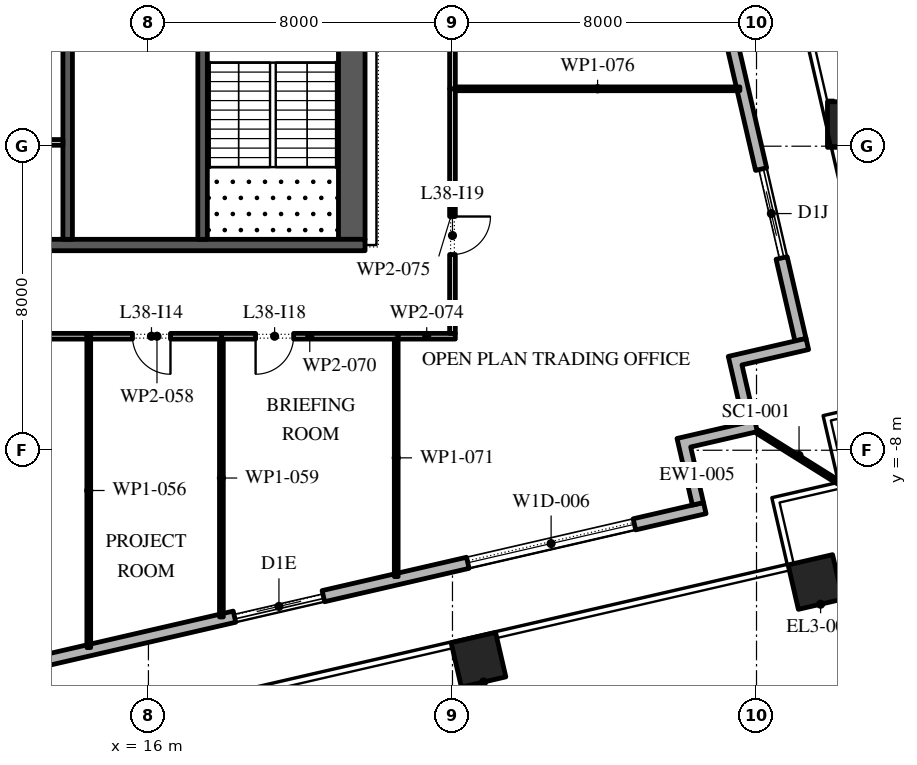
"""IFC4 building model, lengths in metres.
Left out: names, types, materials, properties, quantities, classifications, styles, units other than length and angle.
Written with IfcOpenShell. Run it as: python <this file> out.ifc"""

import sys

from ifc_helpers import new_model, si_unit, direction, frame, frame_2d, origin, origin_2d, place, context, subcontext, project, spatial, polyline, rectangle, outline, extrude, element, fill, save


model = new_model("IFC4")
c1 = context("Model", 3, precision=1e-05, world=origin(), true_north=direction((0.0, 1.0)))
c2 = subcontext(c1, "Body", "Model", "MODEL_VIEW")
j1 = project(units=[si_unit("LENGTHUNIT", "METRE"), si_unit("PLANEANGLEUNIT", "RADIAN")], contexts=[c1])
p1 = place(None, origin())
s1 = spatial("IfcSite", under=j1, at=p1, CompositionType="ELEMENT")
p2 = place(p1, origin())
s2 = spatial("IfcBuilding", under=s1, at=p2, CompositionType="ELEMENT")
p3 = place(p2, frame((0.0, 0.0, 175.8)))
s3 = spatial("IfcBuildingStorey", under=s2, at=p3, CompositionType="ELEMENT", Elevation=175.8)
for number, where, z_axis, x_axis in (
    (1, (24.685, -13.514, 0.0), (0.0, 0.0, 1.0), (0.974, 0.225, 0.0)),
    (2, (33.551, -11.467, 0.0), (0.0, 0.0, 1.0), (0.974, 0.225, 0.0)),
):
    element("IfcColumn", number, at=place(p3, frame(where, z_axis=z_axis, x_axis=x_axis)), inside=s3, PredefinedType="COLUMN", context=c2, shape_type="SweptSolid", body=[
        extrude(rectangle(XDim=1.2, YDim=1.2, at=origin_2d()), origin(), (0.0, 0.0, 1.0), 4.2),
    ])
p4 = place(p3, frame((34.467, 0.57, 0.0), z_axis=(-0.00267376016, 0.011683169396, 0.9999281747), x_axis=(-0.974798272484, -0.223088161862, 0.0)))
e3 = element("IfcColumn", 3, at=p4, inside=s3, PredefinedType="COLUMN", context=c2, shape_type="SweptSolid", body=[
    extrude(rectangle(XDim=1.2, YDim=1.2, at=origin_2d()), origin(), (0.0, 0.0, 1.0), 4.2),
])
p5 = place(p3, frame((-17.592, -20.657, 0.0), z_axis=(0.0, 0.0, 1.0), x_axis=(0.974370243697, 0.224950279389, 0.0)))
e4 = element("IfcWall", 4, at=p5, inside=s3, PredefinedType="STANDARD", context=c2, shape_type="SweptSolid", body=[
    extrude(rectangle(XDim=49.5, YDim=0.3, at=frame_2d((24.75, 0.0))), origin(), (0.0, 0.0, 1.0), 4.0),
])
p6 = place(p5, frame((3.6, 0.0, 0.0)))
e5 = element("IfcOpeningElement", 5, at=p6, cuts=e4, PredefinedType="OPENING", context=c2, shape_type="SweptSolid", body=[
    extrude(rectangle(XDim=2.4, YDim=3.5, at=frame_2d((1.2, 1.75))), frame((0.0, 0.16, 0.0), z_axis=(0.0, -1.0, 0.0), x_axis=(1.0, 0.0, 0.0)), (0.0, 0.0, 1.0), 0.32),
])
p7 = place(p5, frame((9.9, 0.0, 0.45)))
e6 = element("IfcOpeningElement", 6, at=p7, cuts=e4, PredefinedType="OPENING", context=c2, shape_type="SweptSolid", body=[
    extrude(rectangle(XDim=4.5, YDim=2.575, at=frame_2d((2.25, 1.288))), frame((0.0, 0.16, 0.0), z_axis=(0.0, -1.0, 0.0), x_axis=(1.0, 0.0, 0.0)), (0.0, 0.0, 1.0), 0.32),
])
p8 = place(p5, frame((18.2, 0.0, 0.45)))
e7 = element("IfcOpeningElement", 7, at=p8, cuts=e4, PredefinedType="OPENING", context=c2, shape_type="SweptSolid", body=[
    extrude(rectangle(XDim=4.5, YDim=3.05, at=frame_2d((2.25, 1.525))), frame((0.0, 0.16, 0.0), z_axis=(0.0, -1.0, 0.0), x_axis=(1.0, 0.0, 0.0)), (0.0, 0.0, 1.0), 0.32),
])
p9 = place(p5, frame((26.5, 0.0, 0.45)))
e8 = element("IfcOpeningElement", 8, at=p9, cuts=e4, PredefinedType="OPENING", context=c2, shape_type="SweptSolid", body=[
    extrude(rectangle(XDim=4.5, YDim=2.75, at=frame_2d((2.25, 1.375))), frame((0.0, 0.16, 0.0), z_axis=(0.0, -1.0, 0.0), x_axis=(1.0, 0.0, 0.0)), (0.0, 0.0, 1.0), 0.32),
])
p10 = place(p5, frame((36.8, 0.0, 0.0)))
e9 = element("IfcOpeningElement", 9, at=p10, cuts=e4, PredefinedType="OPENING", context=c2, shape_type="SweptSolid", body=[
    extrude(rectangle(XDim=2.4, YDim=3.275, at=frame_2d((1.2, 1.637))), frame((0.0, 0.16, 0.0), z_axis=(0.0, -1.0, 0.0), x_axis=(1.0, 0.0, 0.0)), (0.0, 0.0, 1.0), 0.32),
])
p11 = place(p5, frame((43.1, 0.0, 0.45)))
e10 = element("IfcOpeningElement", 10, at=p11, cuts=e4, PredefinedType="OPENING", context=c2, shape_type="SweptSolid", body=[
    extrude(rectangle(XDim=4.5, YDim=2.875, at=frame_2d((2.25, 1.438))), frame((0.0, 0.16, 0.0), z_axis=(0.0, -1.0, 0.0), x_axis=(1.0, 0.0, 0.0)), (0.0, 0.0, 1.0), 0.32),
])
p12 = place(p3, frame((33.157, -5.092, 0.0), z_axis=(0.0, 0.0, 1.0), x_axis=(-0.224950279389, 0.974370243697, 0.0)))
e11 = element("IfcWall", 11, at=p12, inside=s3, PredefinedType="STANDARD", context=c2, shape_type="SweptSolid", body=[
    extrude(rectangle(XDim=49.5, YDim=0.3, at=frame_2d((24.75, 0.0))), origin(), (0.0, 0.0, 1.0), 4.0),
])
p13 = place(p12, frame((2.207, 0.0, 0.0)))
e12 = element("IfcOpeningElement", 12, at=p13, cuts=e11, PredefinedType="OPENING", context=c2, shape_type="SweptSolid", body=[
    extrude(rectangle(XDim=2.4, YDim=3.125, at=frame_2d((1.2, 1.562))), frame((0.0, 0.16, 0.0), z_axis=(0.0, -1.0, 0.0), x_axis=(1.0, 0.0, 0.0)), (0.0, 0.0, 1.0), 0.32),
])
p14 = place(p12, frame((8.121, 0.0, 0.45)))
e13 = element("IfcOpeningElement", 13, at=p14, cuts=e11, PredefinedType="OPENING", context=c2, shape_type="SweptSolid", body=[
    extrude(rectangle(XDim=4.5, YDim=2.875, at=frame_2d((2.25, 1.438))), frame((0.0, 0.16, 0.0), z_axis=(0.0, -1.0, 0.0), x_axis=(1.0, 0.0, 0.0)), (0.0, 0.0, 1.0), 0.32),
])
p15 = place(p12, frame((15.236, 0.0, 0.45)))
e14 = element("IfcOpeningElement", 14, at=p15, cuts=e11, PredefinedType="OPENING", context=c2, shape_type="SweptSolid", body=[
    extrude(rectangle(XDim=4.5, YDim=2.875, at=frame_2d((2.25, 1.438))), frame((0.0, 0.16, 0.0), z_axis=(0.0, -1.0, 0.0), x_axis=(1.0, 0.0, 0.0)), (0.0, 0.0, 1.0), 0.32),
])
p16 = place(p12, frame((22.35, 0.0, 0.45)))
e15 = element("IfcOpeningElement", 15, at=p16, cuts=e11, PredefinedType="OPENING", context=c2, shape_type="SweptSolid", body=[
    extrude(rectangle(XDim=4.5, YDim=3.0, at=frame_2d((2.25, 1.5))), frame((0.0, 0.16, 0.0), z_axis=(0.0, -1.0, 0.0), x_axis=(1.0, 0.0, 0.0)), (0.0, 0.0, 1.0), 0.32),
])
p17 = place(p12, frame((30.514, 0.0, 0.0)))
e16 = element("IfcOpeningElement", 16, at=p17, cuts=e11, PredefinedType="OPENING", context=c2, shape_type="SweptSolid", body=[
    extrude(rectangle(XDim=2.4, YDim=3.45, at=frame_2d((1.2, 1.725))), frame((0.0, 0.16, 0.0), z_axis=(0.0, -1.0, 0.0), x_axis=(1.0, 0.0, 0.0)), (0.0, 0.0, 1.0), 0.32),
])
p18 = place(p12, frame((36.579, 0.0, 0.45)))
e17 = element("IfcOpeningElement", 17, at=p18, cuts=e11, PredefinedType="OPENING", context=c2, shape_type="SweptSolid", body=[
    extrude(rectangle(XDim=4.5, YDim=3.05, at=frame_2d((2.25, 1.525))), frame((0.0, 0.16, 0.0), z_axis=(0.0, -1.0, 0.0), x_axis=(1.0, 0.0, 0.0)), (0.0, 0.0, 1.0), 0.32),
])
p19 = place(p12, frame((43.693, 0.0, 0.45)))
e18 = element("IfcOpeningElement", 18, at=p19, cuts=e11, PredefinedType="OPENING", context=c2, shape_type="SweptSolid", body=[
    extrude(rectangle(XDim=4.5, YDim=3.05, at=frame_2d((2.25, 1.525))), frame((0.0, 0.16, 0.0), z_axis=(0.0, -1.0, 0.0), x_axis=(1.0, 0.0, 0.0)), (0.0, 0.0, 1.0), 0.32),
])
p20 = place(p3, origin())
e19 = element("IfcWall", 19, at=p20, inside=s3, PredefinedType="STANDARD", context=c2, shape_type="SweptSolid", body=[
    extrude(outline(polyline([(31.662, -7.285), (31.257, -5.531), (33.303, -5.058), (33.371, -5.351), (31.617, -5.756), (32.022, -7.51), (30.268, -7.914), (30.605, -9.376), (30.313, -9.443), (29.908, -7.69), (31.662, -7.285)])), origin(), (0.0, 0.0, 1.0), 4.0),
])
p21 = place(p3, frame((32.022, -7.51, -0.05), z_axis=(0.0, 0.0, 1.0), x_axis=(0.848047176257, -0.529920736377, 0.0)))
e20 = element("IfcWall", 20, at=p21, inside=s3, PredefinedType="STANDARD", context=c2, shape_type="SweptSolid", body=[
    extrude(rectangle(XDim=2.526, YDim=0.1, at=frame_2d((1.263, 0.0))), origin(), (0.0, 0.0, 1.0), 4.05),
])
p22 = place(p3, frame((21.35, -2.45, 0.0), z_axis=(0.0, 0.0, 1.0), x_axis=(0.0, 1.0, 0.0)))
e21 = element("IfcWall", 21, at=p22, inside=s3, PredefinedType="SHEAR", context=c2, shape_type="SweptSolid", body=[
    extrude(rectangle(XDim=27.9, YDim=0.7, at=frame_2d((13.95, 0.0))), origin(), (0.0, 0.0, 1.0), 4.0),
])
p23 = place(p22, frame((5.05, 0.0, 0.0)))
e22 = element("IfcOpeningElement", 22, at=p23, cuts=e21, PredefinedType="OPENING", context=c2, shape_type="SweptSolid", body=[
    extrude(rectangle(XDim=1.2, YDim=2.1, at=frame_2d((0.6, 1.05))), frame((0.0, 0.36, 0.0), z_axis=(0.0, -1.0, 0.0), x_axis=(1.0, 0.0, 0.0)), (0.0, 0.0, 1.0), 0.72),
])
p24 = place(p22, frame((21.65, 0.0, 0.0)))
e23 = element("IfcOpeningElement", 23, at=p24, cuts=e21, PredefinedType="OPENING", context=c2, shape_type="SweptSolid", body=[
    extrude(rectangle(XDim=1.2, YDim=2.1, at=frame_2d((0.6, 1.05))), frame((0.0, 0.36, 0.0), z_axis=(0.0, -1.0, 0.0), x_axis=(1.0, 0.0, 0.0)), (0.0, 0.0, 1.0), 0.72),
])
p25 = place(p3, frame((10.3, -2.6, 0.0), z_axis=(0.0, 0.0, 1.0), x_axis=(1.0, 0.0, 0.0)))
e24 = element("IfcWall", 24, at=p25, inside=s3, PredefinedType="SHEAR", context=c2, shape_type="SweptSolid", body=[
    extrude(rectangle(XDim=11.4, YDim=0.3, at=frame_2d((5.7, 0.0))), origin(), (0.0, 0.0, 1.0), 4.0),
])
p26 = place(p3, frame((17.425, -2.45, 0.0), z_axis=(0.0, 0.0, 1.0), x_axis=(0.0, 1.0, 0.0)))
e25 = element("IfcWall", 25, at=p26, inside=s3, PredefinedType="SHEAR", context=c2, shape_type="SweptSolid", body=[
    extrude(rectangle(XDim=6.3, YDim=0.25, at=frame_2d((3.15, 0.0))), origin(), (0.0, 0.0, 1.0), 4.0),
])
p27 = place(p26, frame((5.05, 0.0, 0.0)))
e26 = element("IfcOpeningElement", 26, at=p27, cuts=e25, PredefinedType="OPENING", context=c2, shape_type="SweptSolid", body=[
    extrude(rectangle(XDim=1.2, YDim=2.1, at=frame_2d((0.6, 1.05))), frame((0.0, 0.135, 0.0), z_axis=(0.0, -1.0, 0.0), x_axis=(1.0, 0.0, 0.0)), (0.0, 0.0, 1.0), 0.27),
])
p28 = place(p3, frame((13.875, -2.45, 0.0), z_axis=(0.0, 0.0, 1.0), x_axis=(0.0, 1.0, 0.0)))
e27 = element("IfcWall", 27, at=p28, inside=s3, PredefinedType="SHEAR", context=c2, shape_type="SweptSolid", body=[
    extrude(rectangle(XDim=21.3, YDim=0.25, at=frame_2d((10.65, 0.0))), origin(), (0.0, 0.0, 1.0), 4.0),
])
p29 = place(p28, frame((17.786, 0.0, 0.0)))
e28 = element("IfcOpeningElement", 28, at=p29, cuts=e27, PredefinedType="OPENING", context=c2, shape_type="SweptSolid", body=[
    extrude(rectangle(XDim=0.9, YDim=2.1, at=frame_2d((0.45, 1.05))), frame((0.0, 0.135, 0.0), z_axis=(0.0, -1.0, 0.0), x_axis=(1.0, 0.0, 0.0)), (0.0, 0.0, 1.0), 0.27),
])
p30 = place(p28, frame((6.971, 0.0, 0.0)))
e29 = element("IfcOpeningElement", 29, at=p30, cuts=e27, PredefinedType="OPENING", context=c2, shape_type="SweptSolid", body=[
    extrude(rectangle(XDim=1.1, YDim=2.1, at=frame_2d((0.55, 1.05))), frame((0.0, 0.135, 0.0), z_axis=(0.0, -1.0, 0.0), x_axis=(1.0, 0.0, 0.0)), (0.0, 0.0, 1.0), 0.27),
])
p31 = place(p28, frame((9.114, 0.0, 0.0)))
e30 = element("IfcOpeningElement", 30, at=p31, cuts=e27, PredefinedType="OPENING", context=c2, shape_type="SweptSolid", body=[
    extrude(rectangle(XDim=1.1, YDim=2.1, at=frame_2d((0.55, 1.05))), frame((0.0, 0.135, 0.0), z_axis=(0.0, -1.0, 0.0), x_axis=(1.0, 0.0, 0.0)), (0.0, 0.0, 1.0), 0.27),
])
p32 = place(p28, frame((11.257, 0.0, 0.0)))
e31 = element("IfcOpeningElement", 31, at=p32, cuts=e27, PredefinedType="OPENING", context=c2, shape_type="SweptSolid", body=[
    extrude(rectangle(XDim=1.1, YDim=2.1, at=frame_2d((0.55, 1.05))), frame((0.0, 0.135, 0.0), z_axis=(0.0, -1.0, 0.0), x_axis=(1.0, 0.0, 0.0)), (0.0, 0.0, 1.0), 0.27),
])
p33 = place(p28, frame((13.4, 0.0, 0.0)))
e32 = element("IfcOpeningElement", 32, at=p33, cuts=e27, PredefinedType="OPENING", context=c2, shape_type="SweptSolid", body=[
    extrude(rectangle(XDim=1.1, YDim=2.1, at=frame_2d((0.55, 1.05))), frame((0.0, 0.135, 0.0), z_axis=(0.0, -1.0, 0.0), x_axis=(1.0, 0.0, 0.0)), (0.0, 0.0, 1.0), 0.27),
])
p34 = place(p3, frame((11.0, 0.1, 0.0), z_axis=(0.0, 0.0, 1.0), x_axis=(1.0, 0.0, 0.0)))
e33 = element("IfcWall", 33, at=p34, inside=s3, PredefinedType="PARTITIONING", context=c2, shape_type="SweptSolid", body=[
    extrude(rectangle(XDim=2.75, YDim=0.15, at=frame_2d((1.375, 0.0))), origin(), (0.0, 0.0, 1.0), 4.0),
])
p35 = place(p3, frame((14.43, -13.193, 0.0), z_axis=(0.0, 0.0, 1.0), x_axis=(0.0, 1.0, 0.0)))
e34 = element("IfcWall", 34, at=p35, inside=s3, PredefinedType="PARTITIONING", context=c2, shape_type="SweptSolid", body=[
    extrude(rectangle(XDim=8.268, YDim=0.1, at=frame_2d((4.134, 0.0))), origin(), (0.0, 0.0, 1.0), 4.0),
])
p36 = place(p3, frame((14.38, -5.0, 0.0), z_axis=(0.0, 0.0, 1.0), x_axis=(-1.0, 0.0, 0.0)))
e35 = element("IfcWall", 35, at=p36, inside=s3, PredefinedType="PARTITIONING", context=c2, shape_type="SweptSolid", body=[
    extrude(rectangle(XDim=4.38, YDim=0.15, at=frame_2d((2.19, 0.0))), origin(), (0.0, 0.0, 1.0), 4.0),
])
p37 = place(p36, frame((1.73, 0.0, 0.0)))
e36 = element("IfcOpeningElement", 36, at=p37, cuts=e35, PredefinedType="OPENING", context=c2, shape_type="SweptSolid", body=[
    extrude(rectangle(XDim=1.0, YDim=2.1, at=frame_2d((0.5, 1.05))), frame((0.0, 0.085, 0.0), z_axis=(0.0, -1.0, 0.0), x_axis=(1.0, 0.0, 0.0)), (0.0, 0.0, 1.0), 0.17),
])
p38 = place(p3, frame((17.97, -5.0, 0.0), z_axis=(0.0, 0.0, 1.0), x_axis=(-1.0, 0.0, 0.0)))
e37 = element("IfcWall", 37, at=p38, inside=s3, PredefinedType="PARTITIONING", context=c2, shape_type="SweptSolid", body=[
    extrude(rectangle(XDim=3.49, YDim=0.15, at=frame_2d((1.745, 0.0))), origin(), (0.0, 0.0, 1.0), 4.0),
])
p39 = place(p38, frame((1.39, 0.0, 0.0)))
e38 = element("IfcOpeningElement", 38, at=p39, cuts=e37, PredefinedType="OPENING", context=c2, shape_type="SweptSolid", body=[
    extrude(rectangle(XDim=1.0, YDim=2.1, at=frame_2d((0.5, 1.05))), frame((0.0, 0.085, 0.0), z_axis=(0.0, -1.0, 0.0), x_axis=(1.0, 0.0, 0.0)), (0.0, 0.0, 1.0), 0.17),
])
p40 = place(p3, frame((17.92, -5.075, 0.0), z_axis=(0.0, 0.0, 1.0), x_axis=(0.0, -1.0, 0.0)))
e39 = element("IfcWall", 39, at=p40, inside=s3, PredefinedType="PARTITIONING", context=c2, shape_type="SweptSolid", body=[
    extrude(rectangle(XDim=7.312, YDim=0.1, at=frame_2d((3.656, 0.0))), origin(), (0.0, 0.0, 1.0), 4.0),
])
p41 = place(p3, frame((22.57, -5.0, 0.0), z_axis=(0.0, 0.0, 1.0), x_axis=(-1.0, 0.0, 0.0)))
e40 = element("IfcWall", 40, at=p41, inside=s3, PredefinedType="PARTITIONING", context=c2, shape_type="SweptSolid", body=[
    extrude(rectangle(XDim=4.65, YDim=0.15, at=frame_2d((2.325, 0.0))), origin(), (0.0, 0.0, 1.0), 4.0),
])
p42 = place(p41, frame((2.75, 0.0, 0.0)))
e41 = element("IfcOpeningElement", 41, at=p42, cuts=e40, PredefinedType="OPENING", context=c2, shape_type="SweptSolid", body=[
    extrude(rectangle(XDim=1.0, YDim=2.1, at=frame_2d((0.5, 1.05))), frame((0.0, 0.085, 0.0), z_axis=(0.0, -1.0, 0.0), x_axis=(1.0, 0.0, 0.0)), (0.0, 0.0, 1.0), 0.17),
])
p43 = place(p3, frame((22.52, -5.075, 0.0), z_axis=(0.0, 0.0, 1.0), x_axis=(0.0, -1.0, 0.0)))
e42 = element("IfcWall", 42, at=p43, inside=s3, PredefinedType="PARTITIONING", context=c2, shape_type="SweptSolid", body=[
    extrude(rectangle(XDim=6.25, YDim=0.1, at=frame_2d((3.125, 0.0))), origin(), (0.0, 0.0, 1.0), 4.0),
])
p44 = place(p3, frame((24.075, -5.0, 0.0), z_axis=(0.0, 0.0, 1.0), x_axis=(-1.0, 0.0, 0.0)))
e43 = element("IfcWall", 43, at=p44, inside=s3, PredefinedType="PARTITIONING", context=c2, shape_type="SweptSolid", body=[
    extrude(rectangle(XDim=1.505, YDim=0.15, at=frame_2d((0.752, 0.0))), origin(), (0.0, 0.0, 1.0), 4.0),
])
p45 = place(p3, frame((24.0, 1.51, 0.0), z_axis=(0.0, 0.0, 1.0), x_axis=(0.0, -1.0, 0.0)))
e44 = element("IfcWall", 44, at=p45, inside=s3, PredefinedType="PARTITIONING", context=c2, shape_type="SweptSolid", body=[
    extrude(rectangle(XDim=6.435, YDim=0.15, at=frame_2d((3.218, 0.0))), origin(), (0.0, 0.0, 1.0), 4.0),
])
p46 = place(p45, frame((3.36, 0.0, 0.0)))
e45 = element("IfcOpeningElement", 45, at=p46, cuts=e44, PredefinedType="OPENING", context=c2, shape_type="SweptSolid", body=[
    extrude(rectangle(XDim=1.0, YDim=2.1, at=frame_2d((0.5, 1.05))), frame((0.0, 0.085, 0.0), z_axis=(0.0, -1.0, 0.0), x_axis=(1.0, 0.0, 0.0)), (0.0, 0.0, 1.0), 0.17),
])
p47 = place(p3, frame((24.075, 1.51, 0.0), z_axis=(0.0, 0.0, 1.0), x_axis=(1.0, 0.0, 0.0)))
e46 = element("IfcWall", 46, at=p47, inside=s3, PredefinedType="PARTITIONING", context=c2, shape_type="SweptSolid", body=[
    extrude(rectangle(XDim=7.487, YDim=0.1, at=frame_2d((3.744, 0.0))), origin(), (0.0, 0.0, 1.0), 4.0),
])
p48 = place(p3, frame((24.0, 8.5, 0.0), z_axis=(0.0, 0.0, 1.0), x_axis=(0.0, -1.0, 0.0)))
e47 = element("IfcWall", 47, at=p48, inside=s3, PredefinedType="PARTITIONING", context=c2, shape_type="SweptSolid", body=[
    extrude(rectangle(XDim=6.99, YDim=0.15, at=frame_2d((3.495, 0.0))), origin(), (0.0, 0.0, 1.0), 4.0),
])
p49 = place(p48, frame((1.59, 0.0, 0.0)))
e48 = element("IfcOpeningElement", 48, at=p49, cuts=e47, PredefinedType="OPENING", context=c2, shape_type="SweptSolid", body=[
    extrude(rectangle(XDim=1.0, YDim=2.1, at=frame_2d((0.5, 1.05))), frame((0.0, 0.085, 0.0), z_axis=(0.0, -1.0, 0.0), x_axis=(1.0, 0.0, 0.0)), (0.0, 0.0, 1.0), 0.17),
])
p50 = place(p10, origin())
e49 = element("IfcDoor", 49, at=p50, inside=s3, OperationType="DOUBLE_DOOR_SLIDING", PredefinedType="DOOR", context=c2, shape_type="SweptSolid", body=[
    extrude(rectangle(XDim=2.4, YDim=3.275, at=frame_2d((1.2, 1.637))), frame((0.0, 0.025, 0.0), z_axis=(0.0, -1.0, 0.0), x_axis=(1.0, 0.0, 0.0)), (0.0, 0.0, 1.0), 0.05),
])
fill(e9, e49)
p51 = place(p11, origin())
e50 = element("IfcWindow", 50, at=p51, inside=s3, PartitioningType="DOUBLE_PANEL_VERTICAL", PredefinedType="WINDOW", context=c2, shape_type="SweptSolid", body=[
    extrude(rectangle(XDim=4.5, YDim=2.875, at=frame_2d((2.25, 1.438))), frame((0.0, 0.03, 0.0), z_axis=(0.0, -1.0, 0.0), x_axis=(1.0, 0.0, 0.0)), (0.0, 0.0, 1.0), 0.06),
])
fill(e10, e50)
p52 = place(p13, origin())
e51 = element("IfcDoor", 51, at=p52, inside=s3, OperationType="DOUBLE_DOOR_SLIDING", PredefinedType="DOOR", context=c2, shape_type="SweptSolid", body=[
    extrude(rectangle(XDim=2.4, YDim=3.125, at=frame_2d((1.2, 1.562))), frame((0.0, 0.025, 0.0), z_axis=(0.0, -1.0, 0.0), x_axis=(1.0, 0.0, 0.0)), (0.0, 0.0, 1.0), 0.05),
])
fill(e12, e51)
p53 = place(p39, origin())
e52 = element("IfcDoor", 52, at=p53, inside=s3, OperationType="SINGLE_SWING_RIGHT", PredefinedType="DOOR", context=c2, shape_type="SweptSolid", body=[
    extrude(rectangle(XDim=1.0, YDim=2.1, at=frame_2d((0.5, 1.05))), frame((0.0, 0.025, 0.0), z_axis=(0.0, -1.0, 0.0), x_axis=(1.0, 0.0, 0.0)), (0.0, 0.0, 1.0), 0.05),
])
fill(e38, e52)
p54 = place(p42, origin())
e53 = element("IfcDoor", 53, at=p54, inside=s3, OperationType="SINGLE_SWING_LEFT", PredefinedType="DOOR", context=c2, shape_type="SweptSolid", body=[
    extrude(rectangle(XDim=1.0, YDim=2.1, at=frame_2d((0.5, 1.05))), frame((0.0, 0.025, 0.0), z_axis=(0.0, -1.0, 0.0), x_axis=(1.0, 0.0, 0.0)), (0.0, 0.0, 1.0), 0.05),
])
fill(e41, e53)
p55 = place(p46, origin())
e54 = element("IfcDoor", 54, at=p55, inside=s3, OperationType="SINGLE_SWING_RIGHT", PredefinedType="DOOR", context=c2, shape_type="SweptSolid", body=[
    extrude(rectangle(XDim=1.0, YDim=2.1, at=frame_2d((0.5, 1.05))), frame((0.0, 0.025, 0.0), z_axis=(0.0, -1.0, 0.0), x_axis=(1.0, 0.0, 0.0)), (0.0, 0.0, 1.0), 0.05),
])
fill(e45, e54)
save(model, sys.argv[1])
